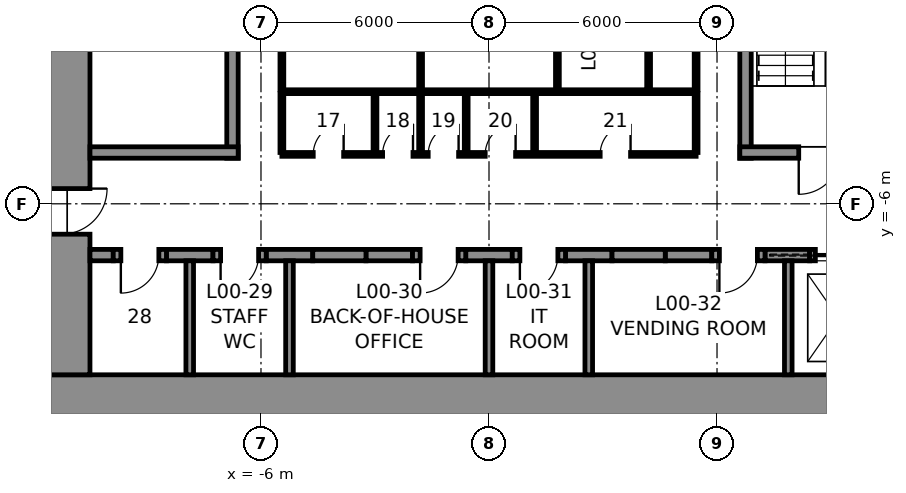
"""IFC4 building model, lengths in metres.
Left out: names, types, materials, properties, quantities, classifications, styles, units other than length and angle.
Written with IfcOpenShell. Run it as: python <this file> out.ifc"""

import sys

from ifc_helpers import new_model, si_unit, direction, frame, frame_2d, origin, place, context, subcontext, project, spatial, rectangle, extrude, element, fill, save


model = new_model("IFC4")
c1 = context("Model", 3, precision=1e-05, world=origin(), true_north=direction((0.0, 1.0)))
c2 = subcontext(c1, "Body", "Model", "MODEL_VIEW")
j1 = project(units=[si_unit("LENGTHUNIT", "METRE"), si_unit("PLANEANGLEUNIT", "RADIAN")], contexts=[c1])
p1 = place(None, origin())
s1 = spatial("IfcSite", under=j1, at=p1, CompositionType="ELEMENT")
p2 = place(p1, origin())
s2 = spatial("IfcBuilding", under=s1, at=p2, CompositionType="ELEMENT")
p3 = place(p2, origin())
s3 = spatial("IfcBuildingStorey", under=s2, at=p3, CompositionType="ELEMENT", Elevation=0.0)
p4 = place(p3, frame((12.0, -11.25, 0.0), z_axis=(0.0, 0.0, 1.0), x_axis=(-1.0, 0.0, 0.0)))
e1 = element("IfcWall", 1, at=p4, inside=s3, PredefinedType="SHEAR", context=c2, shape_type="SweptSolid", body=[
    extrude(rectangle(XDim=24.0, YDim=1.5, at=frame_2d((12.0, 0.0))), origin(), (0.0, 0.0, 1.0), 6.0),
])
p5 = place(p3, frame((-11.25, -10.5, 0.0), z_axis=(0.0, 0.0, 1.0), x_axis=(0.0, 1.0, 0.0)))
e2 = element("IfcWall", 2, at=p5, inside=s3, PredefinedType="SHEAR", context=c2, shape_type="SweptSolid", body=[
    extrude(rectangle(XDim=21.0, YDim=1.5, at=frame_2d((10.5, 0.0))), origin(), (0.0, 0.0, 1.0), 6.0),
])
p6 = place(p5, frame((16.1, 0.0, 0.0)))
e3 = element("IfcOpeningElement", 3, at=p6, cuts=e2, PredefinedType="OPENING", context=c2, shape_type="SweptSolid", body=[
    extrude(rectangle(XDim=1.2, YDim=2.3, at=frame_2d((0.6, 1.15))), frame((0.0, 0.76, 0.0), z_axis=(0.0, -1.0, 0.0), x_axis=(1.0, 0.0, 0.0)), (0.0, 0.0, 1.0), 1.52),
])
p7 = place(p5, frame((3.7, 0.0, 0.0)))
e4 = element("IfcOpeningElement", 4, at=p7, cuts=e2, PredefinedType="OPENING", context=c2, shape_type="SweptSolid", body=[
    extrude(rectangle(XDim=1.2, YDim=2.3, at=frame_2d((0.6, 1.15))), frame((0.0, 0.76, 0.0), z_axis=(0.0, -1.0, 0.0), x_axis=(1.0, 0.0, 0.0)), (0.0, 0.0, 1.0), 1.52),
])
p8 = place(p3, frame((-10.5, -7.35, 0.0), z_axis=(0.0, 0.0, 1.0), x_axis=(1.0, 0.0, 0.0)))
e5 = element("IfcWall", 5, at=p8, inside=s3, PredefinedType="SHEAR", context=c2, shape_type="SweptSolid", body=[
    extrude(rectangle(XDim=0.613, YDim=0.3, at=frame_2d((0.306, 0.0))), origin(), (0.0, 0.0, 1.0), 6.0),
])
for number, where, z_axis, x_axis in (
    (6, (-8.488, -7.35, 0.0), (0.0, 0.0, 1.0), (1.0, 0.0, 0.0)),
    (7, (-5.863, -7.35, 0.0), (0.0, 0.0, 1.0), (1.0, 0.0, 0.0)),
    (8, (-3.238, -7.35, 0.0), (0.0, 0.0, 1.0), (1.0, 0.0, 0.0)),
    (9, (-0.613, -7.35, 0.0), (0.0, 0.0, 1.0), (1.0, 0.0, 0.0)),
    (10, (2.012, -7.35, 0.0), (0.0, 0.0, 1.0), (1.0, 0.0, 0.0)),
    (11, (4.637, -7.35, 0.0), (0.0, 0.0, 1.0), (1.0, 0.0, 0.0)),
):
    element("IfcWall", number, at=place(p3, frame(where, z_axis=z_axis, x_axis=x_axis)), inside=s3, PredefinedType="SHEAR", context=c2, shape_type="SweptSolid", body=[
        extrude(rectangle(XDim=1.225, YDim=0.3, at=frame_2d((0.613, 0.0))), origin(), (0.0, 0.0, 1.0), 6.0),
    ])
p9 = place(p3, frame((7.262, -7.35, 0.0), z_axis=(0.0, 0.0, 1.0), x_axis=(1.0, 0.0, 0.0)))
e12 = element("IfcWall", 12, at=p9, inside=s3, PredefinedType="SHEAR", context=c2, shape_type="SweptSolid", body=[
    extrude(rectangle(XDim=1.175, YDim=0.3, at=frame_2d((0.587, 0.0))), origin(), (0.0, 0.0, 1.0), 6.0),
])
p10 = place(p3, frame((-9.887, -7.35, 0.0), z_axis=(0.0, 0.0, 1.0), x_axis=(1.0, 0.0, 0.0)))
e13 = element("IfcWall", 13, at=p10, inside=s3, PredefinedType="PARTITIONING", context=c2, shape_type="SweptSolid", body=[
    extrude(rectangle(XDim=1.4, YDim=0.3, at=frame_2d((0.7, 0.0))), origin(), (0.0, 0.0, 1.0), 6.0),
])
p11 = place(p10, frame((0.2, 0.0, 0.0)))
e14 = element("IfcOpeningElement", 14, at=p11, cuts=e13, PredefinedType="OPENING", context=c2, shape_type="SweptSolid", body=[
    extrude(rectangle(XDim=1.0, YDim=2.3, at=frame_2d((0.5, 1.15))), frame((0.0, 0.16, 0.0), z_axis=(0.0, -1.0, 0.0), x_axis=(1.0, 0.0, 0.0)), (0.0, 0.0, 1.0), 0.32),
])
p12 = place(p3, frame((-7.262, -7.35, 0.0), z_axis=(0.0, 0.0, 1.0), x_axis=(1.0, 0.0, 0.0)))
e15 = element("IfcWall", 15, at=p12, inside=s3, PredefinedType="PARTITIONING", context=c2, shape_type="SweptSolid", body=[
    extrude(rectangle(XDim=1.4, YDim=0.3, at=frame_2d((0.7, 0.0))), origin(), (0.0, 0.0, 1.0), 6.0),
])
p13 = place(p12, frame((0.2, 0.0, 0.0)))
e16 = element("IfcOpeningElement", 16, at=p13, cuts=e15, PredefinedType="OPENING", context=c2, shape_type="SweptSolid", body=[
    extrude(rectangle(XDim=1.0, YDim=2.3, at=frame_2d((0.5, 1.15))), frame((0.0, 0.16, 0.0), z_axis=(0.0, -1.0, 0.0), x_axis=(1.0, 0.0, 0.0)), (0.0, 0.0, 1.0), 0.32),
])
p14 = place(p3, frame((-4.637, -7.35, 0.0), z_axis=(0.0, 0.0, 1.0), x_axis=(1.0, 0.0, 0.0)))
e17 = element("IfcWall", 17, at=p14, inside=s3, PredefinedType="PARTITIONING", context=c2, shape_type="SweptSolid", body=[
    extrude(rectangle(XDim=1.4, YDim=0.3, at=frame_2d((0.7, 0.0))), origin(), (0.0, 0.0, 1.0), 6.0),
])
p15 = place(p3, frame((-2.012, -7.35, 0.0), z_axis=(0.0, 0.0, 1.0), x_axis=(1.0, 0.0, 0.0)))
e18 = element("IfcWall", 18, at=p15, inside=s3, PredefinedType="PARTITIONING", context=c2, shape_type="SweptSolid", body=[
    extrude(rectangle(XDim=1.4, YDim=0.3, at=frame_2d((0.7, 0.0))), origin(), (0.0, 0.0, 1.0), 6.0),
])
p16 = place(p15, frame((0.2, 0.0, 0.0)))
e19 = element("IfcOpeningElement", 19, at=p16, cuts=e18, PredefinedType="OPENING", context=c2, shape_type="SweptSolid", body=[
    extrude(rectangle(XDim=1.0, YDim=2.3, at=frame_2d((0.5, 1.15))), frame((0.0, 0.16, 0.0), z_axis=(0.0, -1.0, 0.0), x_axis=(1.0, 0.0, 0.0)), (0.0, 0.0, 1.0), 0.32),
])
p17 = place(p3, frame((0.613, -7.35, 0.0), z_axis=(0.0, 0.0, 1.0), x_axis=(1.0, 0.0, 0.0)))
e20 = element("IfcWall", 20, at=p17, inside=s3, PredefinedType="PARTITIONING", context=c2, shape_type="SweptSolid", body=[
    extrude(rectangle(XDim=1.4, YDim=0.3, at=frame_2d((0.7, 0.0))), origin(), (0.0, 0.0, 1.0), 6.0),
])
p18 = place(p17, frame((0.2, 0.0, 0.0)))
e21 = element("IfcOpeningElement", 21, at=p18, cuts=e20, PredefinedType="OPENING", context=c2, shape_type="SweptSolid", body=[
    extrude(rectangle(XDim=1.0, YDim=2.3, at=frame_2d((0.5, 1.15))), frame((0.0, 0.16, 0.0), z_axis=(0.0, -1.0, 0.0), x_axis=(1.0, 0.0, 0.0)), (0.0, 0.0, 1.0), 0.32),
])
p19 = place(p3, frame((3.238, -7.35, 0.0), z_axis=(0.0, 0.0, 1.0), x_axis=(1.0, 0.0, 0.0)))
e22 = element("IfcWall", 22, at=p19, inside=s3, PredefinedType="PARTITIONING", context=c2, shape_type="SweptSolid", body=[
    extrude(rectangle(XDim=1.4, YDim=0.3, at=frame_2d((0.7, 0.0))), origin(), (0.0, 0.0, 1.0), 6.0),
])
p20 = place(p3, frame((5.863, -7.35, 0.0), z_axis=(0.0, 0.0, 1.0), x_axis=(1.0, 0.0, 0.0)))
e23 = element("IfcWall", 23, at=p20, inside=s3, PredefinedType="PARTITIONING", context=c2, shape_type="SweptSolid", body=[
    extrude(rectangle(XDim=1.4, YDim=0.3, at=frame_2d((0.7, 0.0))), origin(), (0.0, 0.0, 1.0), 6.0),
])
p21 = place(p20, frame((0.2, 0.0, 0.0)))
e24 = element("IfcOpeningElement", 24, at=p21, cuts=e23, PredefinedType="OPENING", context=c2, shape_type="SweptSolid", body=[
    extrude(rectangle(XDim=1.0, YDim=2.3, at=frame_2d((0.5, 1.15))), frame((0.0, 0.16, 0.0), z_axis=(0.0, -1.0, 0.0), x_axis=(1.0, 0.0, 0.0)), (0.0, 0.0, 1.0), 0.32),
])
p22 = place(p3, frame((8.438, -7.35, 0.0), z_axis=(0.0, 0.0, 1.0), x_axis=(1.0, 0.0, 0.0)))
e25 = element("IfcWall", 25, at=p22, inside=s3, PredefinedType="PARTITIONING", context=c2, shape_type="SweptSolid", body=[
    extrude(rectangle(XDim=1.5, YDim=0.3, at=frame_2d((0.75, 0.0))), origin(), (0.0, 0.0, 1.0), 6.0),
])
p23 = place(p22, frame((0.15, 0.0, 0.0)))
e26 = element("IfcOpeningElement", 26, at=p23, cuts=e25, PredefinedType="OPENING", context=c2, shape_type="SweptSolid", body=[
    extrude(rectangle(XDim=1.2, YDim=2.3, at=frame_2d((0.6, 1.15))), frame((0.0, 0.16, 0.0), z_axis=(0.0, -1.0, 0.0), x_axis=(1.0, 0.0, 0.0)), (0.0, 0.0, 1.0), 0.32),
])
for number, where, z_axis, x_axis in (
    (27, (-7.875, -10.5, 0.0), (0.0, 0.0, 1.0), (0.0, 1.0, 0.0)),
    (28, (-5.25, -10.5, 0.0), (0.0, 0.0, 1.0), (0.0, 1.0, 0.0)),
    (29, (0.0, -10.5, 0.0), (0.0, 0.0, 1.0), (0.0, 1.0, 0.0)),
    (30, (2.625, -10.5, 0.0), (0.0, 0.0, 1.0), (0.0, 1.0, 0.0)),
    (31, (7.875, -10.5, 0.0), (0.0, 0.0, 1.0), (0.0, 1.0, 0.0)),
):
    element("IfcWall", number, at=place(p3, frame(where, z_axis=z_axis, x_axis=x_axis)), inside=s3, PredefinedType="PARTITIONING", context=c2, shape_type="SweptSolid", body=[
        extrude(rectangle(XDim=3.0, YDim=0.2, at=frame_2d((1.5, 0.0))), origin(), (0.0, 0.0, 1.0), 6.0),
    ])
p24 = place(p3, frame((-6.75, -4.8, 0.0), z_axis=(0.0, 0.0, 1.0), x_axis=(0.0, 1.0, 0.0)))
e32 = element("IfcWall", 32, at=p24, inside=s3, PredefinedType="SOLIDWALL", context=c2, shape_type="SweptSolid", body=[
    extrude(rectangle(XDim=9.6, YDim=0.3, at=frame_2d((4.8, 0.0))), origin(), (0.0, 0.0, 1.0), 5.75),
])
p25 = place(p3, frame((-6.6, -4.65, 0.0), z_axis=(0.0, 0.0, 1.0), x_axis=(-1.0, 0.0, 0.0)))
e33 = element("IfcWall", 33, at=p25, inside=s3, PredefinedType="SOLIDWALL", context=c2, shape_type="SweptSolid", body=[
    extrude(rectangle(XDim=3.9, YDim=0.3, at=frame_2d((1.95, 0.0))), origin(), (0.0, 0.0, 1.0), 5.75),
])
p26 = place(p3, frame((6.75, -4.8, 0.0), z_axis=(0.0, 0.0, 1.0), x_axis=(0.0, 1.0, 0.0)))
e34 = element("IfcWall", 34, at=p26, inside=s3, PredefinedType="SOLIDWALL", context=c2, shape_type="SweptSolid", body=[
    extrude(rectangle(XDim=9.6, YDim=0.3, at=frame_2d((4.8, 0.0))), origin(), (0.0, 0.0, 1.0), 5.75),
])
p27 = place(p3, frame((10.5, -4.65, 0.0), z_axis=(0.0, 0.0, 1.0), x_axis=(-1.0, 0.0, 0.0)))
e35 = element("IfcWall", 35, at=p27, inside=s3, PredefinedType="SOLIDWALL", context=c2, shape_type="SweptSolid", body=[
    extrude(rectangle(XDim=3.9, YDim=0.3, at=frame_2d((1.95, 0.0))), origin(), (0.0, 0.0, 1.0), 5.75),
])
p28 = place(p27, frame((1.25, 0.0, 0.0)))
e36 = element("IfcOpeningElement", 36, at=p28, cuts=e35, PredefinedType="OPENING", context=c2, shape_type="SweptSolid", body=[
    extrude(rectangle(XDim=1.1, YDim=2.3, at=frame_2d((0.55, 1.15))), frame((0.0, 0.16, 0.0), z_axis=(0.0, -1.0, 0.0), x_axis=(1.0, 0.0, 0.0)), (0.0, 0.0, 1.0), 0.32),
])
p29 = place(p3, frame((4.15, -3.05, 0.0), z_axis=(0.0, 0.0, 1.0), x_axis=(-1.0, 0.0, 0.0)))
e37 = element("IfcWall", 37, at=p29, inside=s3, PredefinedType="PARTITIONING", context=c2, shape_type="SweptSolid", body=[
    extrude(rectangle(XDim=9.6, YDim=0.1, at=frame_2d((4.8, 0.0))), origin(), (0.0, 0.0, 1.0), 5.75),
])
p30 = place(p3, frame((5.45, -3.05, 0.0), z_axis=(0.0, 0.0, 1.0), x_axis=(-1.0, 0.0, 0.0)))
e38 = element("IfcWall", 38, at=p30, inside=s3, PredefinedType="PARTITIONING", context=c2, shape_type="SweptSolid", body=[
    extrude(rectangle(XDim=1.3, YDim=0.1, at=frame_2d((0.65, 0.0))), origin(), (0.0, 0.0, 1.0), 5.75),
])
for number, where, z_axis, x_axis in (
    (39, (5.45, 3.0, 0.0), (0.0, 0.0, 1.0), (0.0, -1.0, 0.0)),
    (40, (-5.45, -3.0, 0.0), (0.0, 0.0, 1.0), (0.0, 1.0, 0.0)),
    (41, (-1.8, -3.0, 0.0), (0.0, 0.0, 1.0), (0.0, 1.0, 0.0)),
    (42, (1.8, -3.0, 0.0), (0.0, 0.0, 1.0), (0.0, 1.0, 0.0)),
    (43, (4.2, -3.0, 0.0), (0.0, 0.0, 1.0), (0.0, 1.0, 0.0)),
):
    element("IfcWall", number, at=place(p3, frame(where, z_axis=z_axis, x_axis=x_axis)), inside=s3, PredefinedType="PARTITIONING", context=c2, shape_type="SweptSolid", body=[
        extrude(rectangle(XDim=6.0, YDim=0.1, at=frame_2d((3.0, 0.0))), origin(), (0.0, 0.0, 1.0), 5.75),
    ])
p31 = place(p3, frame((5.45, -4.7, 0.0), z_axis=(0.0, 0.0, 1.0), x_axis=(-1.0, 0.0, 0.0)))
e44 = element("IfcWall", 44, at=p31, inside=s3, PredefinedType="PARTITIONING", context=c2, shape_type="SweptSolid", body=[
    extrude(rectangle(XDim=10.9, YDim=0.1, at=frame_2d((5.45, 0.0))), origin(), (0.0, 0.0, 1.0), 5.75),
])
p32 = place(p31, frame((9.275, 0.0, 0.0)))
e45 = element("IfcOpeningElement", 45, at=p32, cuts=e44, PredefinedType="OPENING", context=c2, shape_type="SweptSolid", body=[
    extrude(rectangle(XDim=0.8, YDim=2.3, at=frame_2d((0.4, 1.15))), frame((0.0, 0.06, 0.0), z_axis=(0.0, -1.0, 0.0), x_axis=(1.0, 0.0, 0.0)), (0.0, 0.0, 1.0), 0.12),
])
p33 = place(p31, frame((7.45, 0.0, 0.0)))
e46 = element("IfcOpeningElement", 46, at=p33, cuts=e44, PredefinedType="OPENING", context=c2, shape_type="SweptSolid", body=[
    extrude(rectangle(XDim=0.8, YDim=2.3, at=frame_2d((0.4, 1.15))), frame((0.0, 0.06, 0.0), z_axis=(0.0, -1.0, 0.0), x_axis=(1.0, 0.0, 0.0)), (0.0, 0.0, 1.0), 0.12),
])
p34 = place(p31, frame((6.25, 0.0, 0.0)))
e47 = element("IfcOpeningElement", 47, at=p34, cuts=e44, PredefinedType="OPENING", context=c2, shape_type="SweptSolid", body=[
    extrude(rectangle(XDim=0.8, YDim=2.3, at=frame_2d((0.4, 1.15))), frame((0.0, 0.06, 0.0), z_axis=(0.0, -1.0, 0.0), x_axis=(1.0, 0.0, 0.0)), (0.0, 0.0, 1.0), 0.12),
])
p35 = place(p31, frame((4.75, 0.0, 0.0)))
e48 = element("IfcOpeningElement", 48, at=p35, cuts=e44, PredefinedType="OPENING", context=c2, shape_type="SweptSolid", body=[
    extrude(rectangle(XDim=0.8, YDim=2.3, at=frame_2d((0.4, 1.15))), frame((0.0, 0.06, 0.0), z_axis=(0.0, -1.0, 0.0), x_axis=(1.0, 0.0, 0.0)), (0.0, 0.0, 1.0), 0.12),
])
p36 = place(p31, frame((1.725, 0.0, 0.0)))
e49 = element("IfcOpeningElement", 49, at=p36, cuts=e44, PredefinedType="OPENING", context=c2, shape_type="SweptSolid", body=[
    extrude(rectangle(XDim=0.8, YDim=2.3, at=frame_2d((0.4, 1.15))), frame((0.0, 0.06, 0.0), z_axis=(0.0, -1.0, 0.0), x_axis=(1.0, 0.0, 0.0)), (0.0, 0.0, 1.0), 0.12),
])
for number, where, z_axis, x_axis in (
    (50, (-5.45, -3.1, 0.0), (0.0, 0.0, 1.0), (0.0, -1.0, 0.0)),
    (51, (5.45, -3.1, 0.0), (0.0, 0.0, 1.0), (0.0, -1.0, 0.0)),
    (52, (-3.0, -3.1, 0.0), (0.0, 0.0, 1.0), (0.0, -1.0, 0.0)),
    (53, (-1.8, -3.1, 0.0), (0.0, 0.0, 1.0), (0.0, -1.0, 0.0)),
    (54, (-0.6, -3.1, 0.0), (0.0, 0.0, 1.0), (0.0, -1.0, 0.0)),
    (55, (1.2, -3.1, 0.0), (0.0, 0.0, 1.0), (0.0, -1.0, 0.0)),
):
    element("IfcWall", number, at=place(p3, frame(where, z_axis=z_axis, x_axis=x_axis)), inside=s3, PredefinedType="PARTITIONING", context=c2, shape_type="SweptSolid", body=[
        extrude(rectangle(XDim=1.55, YDim=0.1, at=frame_2d((0.775, 0.0))), origin(), (0.0, 0.0, 1.0), 5.75),
    ])
p37 = place(p28, origin())
e56 = element("IfcDoor", 56, at=p37, inside=s3, OperationType="SINGLE_SWING_RIGHT", PredefinedType="DOOR", context=c2, shape_type="SweptSolid", body=[
    extrude(rectangle(XDim=1.1, YDim=2.3, at=frame_2d((0.55, 1.15))), frame((0.0, 0.025, 0.0), z_axis=(0.0, -1.0, 0.0), x_axis=(1.0, 0.0, 0.0)), (0.0, 0.0, 1.0), 0.05),
])
fill(e36, e56)
p38 = place(p32, frame((0.8, 0.0, 0.0), z_axis=(0.0, 0.0, 1.0), x_axis=(-1.0, 0.0, 0.0)))
e57 = element("IfcDoor", 57, at=p38, inside=s3, OperationType="SINGLE_SWING_RIGHT", PredefinedType="DOOR", context=c2, shape_type="SweptSolid", body=[
    extrude(rectangle(XDim=0.8, YDim=2.3, at=frame_2d((0.4, 1.15))), frame((0.0, 0.025, 0.0), z_axis=(0.0, -1.0, 0.0), x_axis=(1.0, 0.0, 0.0)), (0.0, 0.0, 1.0), 0.05),
])
fill(e45, e57)
p39 = place(p33, frame((0.8, 0.0, 0.0), z_axis=(0.0, 0.0, 1.0), x_axis=(-1.0, 0.0, 0.0)))
e58 = element("IfcDoor", 58, at=p39, inside=s3, OperationType="SINGLE_SWING_RIGHT", PredefinedType="DOOR", context=c2, shape_type="SweptSolid", body=[
    extrude(rectangle(XDim=0.8, YDim=2.3, at=frame_2d((0.4, 1.15))), frame((0.0, 0.025, 0.0), z_axis=(0.0, -1.0, 0.0), x_axis=(1.0, 0.0, 0.0)), (0.0, 0.0, 1.0), 0.05),
])
fill(e46, e58)
p40 = place(p34, frame((0.8, 0.0, 0.0), z_axis=(0.0, 0.0, 1.0), x_axis=(-1.0, 0.0, 0.0)))
e59 = element("IfcDoor", 59, at=p40, inside=s3, OperationType="SINGLE_SWING_RIGHT", PredefinedType="DOOR", context=c2, shape_type="SweptSolid", body=[
    extrude(rectangle(XDim=0.8, YDim=2.3, at=frame_2d((0.4, 1.15))), frame((0.0, 0.025, 0.0), z_axis=(0.0, -1.0, 0.0), x_axis=(1.0, 0.0, 0.0)), (0.0, 0.0, 1.0), 0.05),
])
fill(e47, e59)
p41 = place(p35, frame((0.8, 0.0, 0.0), z_axis=(0.0, 0.0, 1.0), x_axis=(-1.0, 0.0, 0.0)))
e60 = element("IfcDoor", 60, at=p41, inside=s3, OperationType="SINGLE_SWING_RIGHT", PredefinedType="DOOR", context=c2, shape_type="SweptSolid", body=[
    extrude(rectangle(XDim=0.8, YDim=2.3, at=frame_2d((0.4, 1.15))), frame((0.0, 0.025, 0.0), z_axis=(0.0, -1.0, 0.0), x_axis=(1.0, 0.0, 0.0)), (0.0, 0.0, 1.0), 0.05),
])
fill(e48, e60)
p42 = place(p36, frame((0.8, 0.0, 0.0), z_axis=(0.0, 0.0, 1.0), x_axis=(-1.0, 0.0, 0.0)))
e61 = element("IfcDoor", 61, at=p42, inside=s3, OperationType="SINGLE_SWING_RIGHT", PredefinedType="DOOR", context=c2, shape_type="SweptSolid", body=[
    extrude(rectangle(XDim=0.8, YDim=2.3, at=frame_2d((0.4, 1.15))), frame((0.0, 0.025, 0.0), z_axis=(0.0, -1.0, 0.0), x_axis=(1.0, 0.0, 0.0)), (0.0, 0.0, 1.0), 0.05),
])
fill(e49, e61)
p43 = place(p11, frame((1.0, 0.0, 0.0), z_axis=(0.0, 0.0, 1.0), x_axis=(-1.0, 0.0, 0.0)))
e62 = element("IfcDoor", 62, at=p43, inside=s3, OperationType="SINGLE_SWING_RIGHT", PredefinedType="DOOR", context=c2, shape_type="SweptSolid", body=[
    extrude(rectangle(XDim=1.0, YDim=2.3, at=frame_2d((0.5, 1.15))), frame((0.0, 0.025, 0.0), z_axis=(0.0, -1.0, 0.0), x_axis=(1.0, 0.0, 0.0)), (0.0, 0.0, 1.0), 0.05),
])
fill(e14, e62)
p44 = place(p13, frame((1.0, 0.0, 0.0), z_axis=(0.0, 0.0, 1.0), x_axis=(-1.0, 0.0, 0.0)))
e63 = element("IfcDoor", 63, at=p44, inside=s3, OperationType="SINGLE_SWING_RIGHT", PredefinedType="DOOR", context=c2, shape_type="SweptSolid", body=[
    extrude(rectangle(XDim=1.0, YDim=2.3, at=frame_2d((0.5, 1.15))), frame((0.0, 0.025, 0.0), z_axis=(0.0, -1.0, 0.0), x_axis=(1.0, 0.0, 0.0)), (0.0, 0.0, 1.0), 0.05),
])
fill(e16, e63)
p45 = place(p16, frame((1.0, 0.0, 0.0), z_axis=(0.0, 0.0, 1.0), x_axis=(-1.0, 0.0, 0.0)))
e64 = element("IfcDoor", 64, at=p45, inside=s3, OperationType="SINGLE_SWING_RIGHT", PredefinedType="DOOR", context=c2, shape_type="SweptSolid", body=[
    extrude(rectangle(XDim=1.0, YDim=2.3, at=frame_2d((0.5, 1.15))), frame((0.0, 0.025, 0.0), z_axis=(0.0, -1.0, 0.0), x_axis=(1.0, 0.0, 0.0)), (0.0, 0.0, 1.0), 0.05),
])
fill(e19, e64)
p46 = place(p18, frame((1.0, 0.0, 0.0), z_axis=(0.0, 0.0, 1.0), x_axis=(-1.0, 0.0, 0.0)))
e65 = element("IfcDoor", 65, at=p46, inside=s3, OperationType="SINGLE_SWING_RIGHT", PredefinedType="DOOR", context=c2, shape_type="SweptSolid", body=[
    extrude(rectangle(XDim=1.0, YDim=2.3, at=frame_2d((0.5, 1.15))), frame((0.0, 0.025, 0.0), z_axis=(0.0, -1.0, 0.0), x_axis=(1.0, 0.0, 0.0)), (0.0, 0.0, 1.0), 0.05),
])
fill(e21, e65)
p47 = place(p21, frame((1.0, 0.0, 0.0), z_axis=(0.0, 0.0, 1.0), x_axis=(-1.0, 0.0, 0.0)))
e66 = element("IfcDoor", 66, at=p47, inside=s3, OperationType="SINGLE_SWING_RIGHT", PredefinedType="DOOR", context=c2, shape_type="SweptSolid", body=[
    extrude(rectangle(XDim=1.0, YDim=2.3, at=frame_2d((0.5, 1.15))), frame((0.0, 0.025, 0.0), z_axis=(0.0, -1.0, 0.0), x_axis=(1.0, 0.0, 0.0)), (0.0, 0.0, 1.0), 0.05),
])
fill(e24, e66)
p48 = place(p7, frame((1.2, 0.0, 0.0), z_axis=(0.0, 0.0, 1.0), x_axis=(-1.0, 0.0, 0.0)))
e67 = element("IfcDoor", 67, at=p48, inside=s3, OperationType="SINGLE_SWING_LEFT", PredefinedType="DOOR", context=c2, shape_type="SweptSolid", body=[
    extrude(rectangle(XDim=1.2, YDim=2.3, at=frame_2d((0.6, 1.15))), frame((0.0, 0.025, 0.0), z_axis=(0.0, -1.0, 0.0), x_axis=(1.0, 0.0, 0.0)), (0.0, 0.0, 1.0), 0.05),
])
fill(e4, e67)
p49 = place(p23, origin())
e68 = element("IfcDoor", 68, at=p49, inside=s3, OperationType="SLIDING_TO_LEFT", PredefinedType="DOOR", context=c2, shape_type="SweptSolid", body=[
    extrude(rectangle(XDim=1.2, YDim=2.3, at=frame_2d((0.6, 1.15))), frame((0.0, 0.025, 0.0), z_axis=(0.0, -1.0, 0.0), x_axis=(1.0, 0.0, 0.0)), (0.0, 0.0, 1.0), 0.05),
])
fill(e26, e68)
save(model, sys.argv[1])
